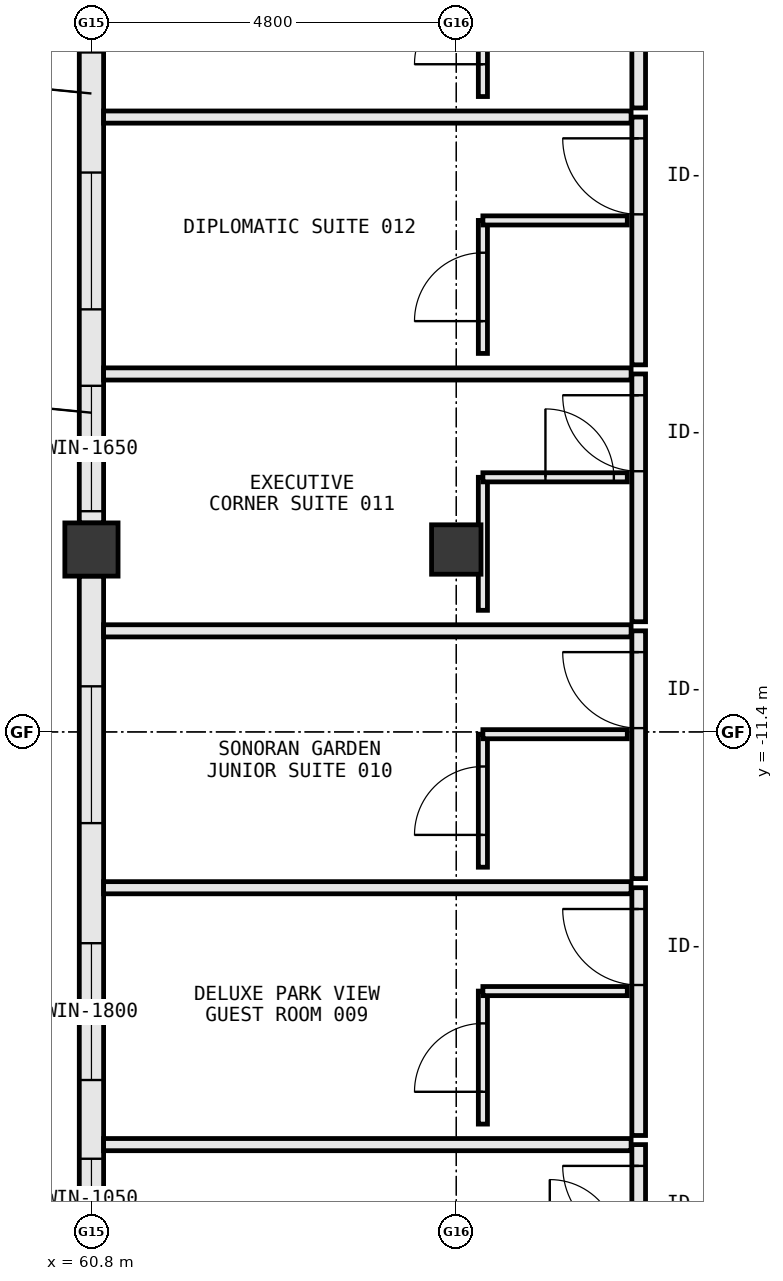
"""IFC4 building model, lengths in metres.
Left out: names, types, materials, properties, quantities, classifications, styles, units other than length and angle.
Written with IfcOpenShell. Run it as: python <this file> out.ifc"""

import sys

from ifc_helpers import new_model, si_unit, direction, frame, frame_2d, origin, origin_2d, place, context, subcontext, project, spatial, rectangle, extrude, element, fill, save


model = new_model("IFC4")
c1 = context("Model", 3, precision=1e-05, world=origin(), true_north=direction((0.0, 1.0)))
c2 = subcontext(c1, "Body", "Model", "MODEL_VIEW")
j1 = project(units=[si_unit("LENGTHUNIT", "METRE"), si_unit("PLANEANGLEUNIT", "RADIAN")], contexts=[c1])
p1 = place(None, origin())
s1 = spatial("IfcSite", under=j1, at=p1, CompositionType="ELEMENT")
p2 = place(p1, origin())
s2 = spatial("IfcBuilding", under=s1, at=p2, CompositionType="ELEMENT")
p3 = place(p2, frame((0.0, 0.0, 10.8)))
s3 = spatial("IfcBuildingStorey", under=s2, at=p3, CompositionType="ELEMENT", Elevation=10.8)
p4 = place(p3, frame((60.8, -9.0, 0.0), z_axis=(0.0, 0.0, 1.0), x_axis=(1.0, 0.0, 0.0)))
e1 = element("IfcColumn", 1, at=p4, inside=s3, PredefinedType="COLUMN", context=c2, shape_type="SweptSolid", body=[
    extrude(rectangle(XDim=0.7, YDim=0.7, at=origin_2d()), origin(), (0.0, 0.0, 1.0), 5.4),
])
p5 = place(p3, frame((65.6, -9.0, 0.0), z_axis=(0.0, 0.0, 1.0), x_axis=(1.0, 0.0, 0.0)))
e2 = element("IfcColumn", 2, at=p5, inside=s3, PredefinedType="COLUMN", context=c2, shape_type="SweptSolid", body=[
    extrude(rectangle(XDim=0.65, YDim=0.65, at=origin_2d()), origin(), (0.0, 0.0, 1.0), 5.4),
])
p6 = place(p3, frame((60.8, 0.252, 0.0), z_axis=(0.0, 0.0, 1.0), x_axis=(0.0, -1.0, 0.0)))
e3 = element("IfcWall", 3, at=p6, inside=s3, PredefinedType="STANDARD", context=c2, shape_type="SweptSolid", body=[
    extrude(rectangle(XDim=8.904, YDim=0.32, at=frame_2d((4.452, 0.0))), origin(), (0.0, 0.0, 1.0), 4.155),
])
p7 = place(p6, frame((7.098, 0.0, 0.85)))
e4 = element("IfcOpeningElement", 4, at=p7, cuts=e3, PredefinedType="OPENING", context=c2, shape_type="SweptSolid", body=[
    extrude(rectangle(XDim=1.65, YDim=1.8, at=frame_2d((0.825, 0.9))), frame((0.0, 0.172, 0.0), z_axis=(0.0, -1.0, 0.0), x_axis=(1.0, 0.0, 0.0)), (0.0, 0.0, 1.0), 0.344),
])
p8 = place(p6, frame((4.292, 0.0, 0.85)))
e5 = element("IfcOpeningElement", 5, at=p8, cuts=e3, PredefinedType="OPENING", context=c2, shape_type="SweptSolid", body=[
    extrude(rectangle(XDim=1.8, YDim=1.85, at=frame_2d((0.9, 0.925))), frame((0.0, 0.172, 0.0), z_axis=(0.0, -1.0, 0.0), x_axis=(1.0, 0.0, 0.0)), (0.0, 0.0, 1.0), 0.344),
])
p9 = place(p6, frame((0.912, 0.0, 0.85)))
e6 = element("IfcOpeningElement", 6, at=p9, cuts=e3, PredefinedType="OPENING", context=c2, shape_type="SweptSolid", body=[
    extrude(rectangle(XDim=1.8, YDim=1.85, at=frame_2d((0.9, 0.925))), frame((0.0, 0.172, 0.0), z_axis=(0.0, -1.0, 0.0), x_axis=(1.0, 0.0, 0.0)), (0.0, 0.0, 1.0), 0.344),
])
p10 = place(p3, frame((60.8, -9.348, 0.0), z_axis=(0.0, 0.0, 1.0), x_axis=(0.0, -1.0, 0.0)))
e7 = element("IfcWall", 7, at=p10, inside=s3, PredefinedType="STANDARD", context=c2, shape_type="SweptSolid", body=[
    extrude(rectangle(XDim=8.904, YDim=0.32, at=frame_2d((4.452, 0.0))), origin(), (0.0, 0.0, 1.0), 4.155),
])
p11 = place(p10, frame((7.668, 0.0, 0.85)))
e8 = element("IfcOpeningElement", 8, at=p11, cuts=e7, PredefinedType="OPENING", context=c2, shape_type="SweptSolid", body=[
    extrude(rectangle(XDim=1.05, YDim=1.45, at=frame_2d((0.525, 0.725))), frame((0.0, 0.172, 0.0), z_axis=(0.0, -1.0, 0.0), x_axis=(1.0, 0.0, 0.0)), (0.0, 0.0, 1.0), 0.344),
])
p12 = place(p10, frame((4.832, 0.0, 0.85)))
e9 = element("IfcOpeningElement", 9, at=p12, cuts=e7, PredefinedType="OPENING", context=c2, shape_type="SweptSolid", body=[
    extrude(rectangle(XDim=1.8, YDim=1.85, at=frame_2d((0.9, 0.925))), frame((0.0, 0.172, 0.0), z_axis=(0.0, -1.0, 0.0), x_axis=(1.0, 0.0, 0.0)), (0.0, 0.0, 1.0), 0.344),
])
p13 = place(p10, frame((1.452, 0.0, 0.85)))
e10 = element("IfcOpeningElement", 10, at=p13, cuts=e7, PredefinedType="OPENING", context=c2, shape_type="SweptSolid", body=[
    extrude(rectangle(XDim=1.8, YDim=1.85, at=frame_2d((0.9, 0.925))), frame((0.0, 0.172, 0.0), z_axis=(0.0, -1.0, 0.0), x_axis=(1.0, 0.0, 0.0)), (0.0, 0.0, 1.0), 0.344),
])
p14 = place(p3, frame((68.0, -20.09, 0.0), z_axis=(0.0, 0.0, 1.0), x_axis=(0.0, 1.0, 0.0)))
e11 = element("IfcWall", 11, at=p14, inside=s3, PredefinedType="PARTITIONING", context=c2, shape_type="SweptSolid", body=[
    extrude(rectangle(XDim=3.26, YDim=0.18, at=frame_2d((1.63, 0.0))), origin(), (0.0, 0.0, 1.0), 4.8),
])
p15 = place(p14, frame((1.98, 0.0, 0.0)))
e12 = element("IfcOpeningElement", 12, at=p15, cuts=e11, PredefinedType="OPENING", context=c2, shape_type="SweptSolid", body=[
    extrude(rectangle(XDim=1.0, YDim=2.2, at=frame_2d((0.5, 1.1))), frame((0.0, 0.102, 0.0), z_axis=(0.0, -1.0, 0.0), x_axis=(1.0, 0.0, 0.0)), (0.0, 0.0, 1.0), 0.204),
])
p16 = place(p3, frame((60.96, -16.83, 0.0), z_axis=(0.0, 0.0, 1.0), x_axis=(1.0, 0.0, 0.0)))
e13 = element("IfcWall", 13, at=p16, inside=s3, PredefinedType="PARTITIONING", context=c2, shape_type="SweptSolid", body=[
    extrude(rectangle(XDim=6.94, YDim=0.16, at=frame_2d((3.47, 0.0))), origin(), (0.0, 0.0, 1.0), 4.8),
])
p17 = place(p3, frame((68.0, -16.71, 0.0), z_axis=(0.0, 0.0, 1.0), x_axis=(0.0, 1.0, 0.0)))
e14 = element("IfcWall", 14, at=p17, inside=s3, PredefinedType="PARTITIONING", context=c2, shape_type="SweptSolid", body=[
    extrude(rectangle(XDim=3.26, YDim=0.18, at=frame_2d((1.63, 0.0))), origin(), (0.0, 0.0, 1.0), 4.8),
])
p18 = place(p17, frame((1.98, 0.0, 0.0)))
e15 = element("IfcOpeningElement", 15, at=p18, cuts=e14, PredefinedType="OPENING", context=c2, shape_type="SweptSolid", body=[
    extrude(rectangle(XDim=1.0, YDim=2.2, at=frame_2d((0.5, 1.1))), frame((0.0, 0.102, 0.0), z_axis=(0.0, -1.0, 0.0), x_axis=(1.0, 0.0, 0.0)), (0.0, 0.0, 1.0), 0.204),
])
p19 = place(p3, frame((60.96, -13.45, 0.0), z_axis=(0.0, 0.0, 1.0), x_axis=(1.0, 0.0, 0.0)))
e16 = element("IfcWall", 16, at=p19, inside=s3, PredefinedType="PARTITIONING", context=c2, shape_type="SweptSolid", body=[
    extrude(rectangle(XDim=6.94, YDim=0.16, at=frame_2d((3.47, 0.0))), origin(), (0.0, 0.0, 1.0), 4.8),
])
p20 = place(p3, frame((65.95, -16.56, 0.0), z_axis=(0.0, 0.0, 1.0), x_axis=(0.0, 1.0, 0.0)))
e17 = element("IfcWall", 17, at=p20, inside=s3, PredefinedType="PARTITIONING", context=c2, shape_type="SweptSolid", body=[
    extrude(rectangle(XDim=1.75, YDim=0.12, at=frame_2d((0.875, 0.0))), origin(), (0.0, 0.0, 1.0), 4.155),
])
p21 = place(p20, frame((0.425, 0.0, 0.0)))
e18 = element("IfcOpeningElement", 18, at=p21, cuts=e17, PredefinedType="OPENING", context=c2, shape_type="SweptSolid", body=[
    extrude(rectangle(XDim=0.9, YDim=2.15, at=frame_2d((0.45, 1.075))), frame((0.0, 0.072, 0.0), z_axis=(0.0, -1.0, 0.0), x_axis=(1.0, 0.0, 0.0)), (0.0, 0.0, 1.0), 0.144),
])
p22 = place(p3, frame((65.95, -14.81, 0.0), z_axis=(0.0, 0.0, 1.0), x_axis=(1.0, 0.0, 0.0)))
e19 = element("IfcWall", 19, at=p22, inside=s3, PredefinedType="PARTITIONING", context=c2, shape_type="SweptSolid", body=[
    extrude(rectangle(XDim=1.9, YDim=0.12, at=frame_2d((0.95, 0.0))), origin(), (0.0, 0.0, 1.0), 4.8),
])
p23 = place(p3, frame((68.0, -13.33, 0.0), z_axis=(0.0, 0.0, 1.0), x_axis=(0.0, 1.0, 0.0)))
e20 = element("IfcWall", 20, at=p23, inside=s3, PredefinedType="PARTITIONING", context=c2, shape_type="SweptSolid", body=[
    extrude(rectangle(XDim=3.26, YDim=0.18, at=frame_2d((1.63, 0.0))), origin(), (0.0, 0.0, 1.0), 4.8),
])
p24 = place(p23, frame((1.98, 0.0, 0.0)))
e21 = element("IfcOpeningElement", 21, at=p24, cuts=e20, PredefinedType="OPENING", context=c2, shape_type="SweptSolid", body=[
    extrude(rectangle(XDim=1.0, YDim=2.2, at=frame_2d((0.5, 1.1))), frame((0.0, 0.102, 0.0), z_axis=(0.0, -1.0, 0.0), x_axis=(1.0, 0.0, 0.0)), (0.0, 0.0, 1.0), 0.204),
])
p25 = place(p3, frame((60.96, -10.07, 0.0), z_axis=(0.0, 0.0, 1.0), x_axis=(1.0, 0.0, 0.0)))
e22 = element("IfcWall", 22, at=p25, inside=s3, PredefinedType="PARTITIONING", context=c2, shape_type="SweptSolid", body=[
    extrude(rectangle(XDim=6.94, YDim=0.16, at=frame_2d((3.47, 0.0))), origin(), (0.0, 0.0, 1.0), 4.8),
])
p26 = place(p3, frame((65.95, -13.18, 0.0), z_axis=(0.0, 0.0, 1.0), x_axis=(0.0, 1.0, 0.0)))
e23 = element("IfcWall", 23, at=p26, inside=s3, PredefinedType="PARTITIONING", context=c2, shape_type="SweptSolid", body=[
    extrude(rectangle(XDim=1.75, YDim=0.12, at=frame_2d((0.875, 0.0))), origin(), (0.0, 0.0, 1.0), 4.155),
])
p27 = place(p26, frame((0.425, 0.0, 0.0)))
e24 = element("IfcOpeningElement", 24, at=p27, cuts=e23, PredefinedType="OPENING", context=c2, shape_type="SweptSolid", body=[
    extrude(rectangle(XDim=0.9, YDim=2.15, at=frame_2d((0.45, 1.075))), frame((0.0, 0.072, 0.0), z_axis=(0.0, -1.0, 0.0), x_axis=(1.0, 0.0, 0.0)), (0.0, 0.0, 1.0), 0.144),
])
p28 = place(p3, frame((65.95, -11.43, 0.0), z_axis=(0.0, 0.0, 1.0), x_axis=(1.0, 0.0, 0.0)))
e25 = element("IfcWall", 25, at=p28, inside=s3, PredefinedType="PARTITIONING", context=c2, shape_type="SweptSolid", body=[
    extrude(rectangle(XDim=1.9, YDim=0.12, at=frame_2d((0.95, 0.0))), origin(), (0.0, 0.0, 1.0), 4.8),
])
p29 = place(p3, frame((68.0, -9.95, 0.0), z_axis=(0.0, 0.0, 1.0), x_axis=(0.0, 1.0, 0.0)))
e26 = element("IfcWall", 26, at=p29, inside=s3, PredefinedType="PARTITIONING", context=c2, shape_type="SweptSolid", body=[
    extrude(rectangle(XDim=3.26, YDim=0.18, at=frame_2d((1.63, 0.0))), origin(), (0.0, 0.0, 1.0), 4.8),
])
p30 = place(p29, frame((1.98, 0.0, 0.0)))
e27 = element("IfcOpeningElement", 27, at=p30, cuts=e26, PredefinedType="OPENING", context=c2, shape_type="SweptSolid", body=[
    extrude(rectangle(XDim=1.0, YDim=2.2, at=frame_2d((0.5, 1.1))), frame((0.0, 0.102, 0.0), z_axis=(0.0, -1.0, 0.0), x_axis=(1.0, 0.0, 0.0)), (0.0, 0.0, 1.0), 0.204),
])
p31 = place(p3, frame((60.96, -6.69, 0.0), z_axis=(0.0, 0.0, 1.0), x_axis=(1.0, 0.0, 0.0)))
e28 = element("IfcWall", 28, at=p31, inside=s3, PredefinedType="PARTITIONING", context=c2, shape_type="SweptSolid", body=[
    extrude(rectangle(XDim=6.94, YDim=0.16, at=frame_2d((3.47, 0.0))), origin(), (0.0, 0.0, 1.0), 4.8),
])
p32 = place(p3, frame((65.95, -9.8, 0.0), z_axis=(0.0, 0.0, 1.0), x_axis=(0.0, 1.0, 0.0)))
e29 = element("IfcWall", 29, at=p32, inside=s3, PredefinedType="PARTITIONING", context=c2, shape_type="SweptSolid", body=[
    extrude(rectangle(XDim=1.75, YDim=0.12, at=frame_2d((0.875, 0.0))), origin(), (0.0, 0.0, 1.0), 4.155),
])
p33 = place(p3, frame((65.95, -8.05, 0.0), z_axis=(0.0, 0.0, 1.0), x_axis=(1.0, 0.0, 0.0)))
e30 = element("IfcWall", 30, at=p33, inside=s3, PredefinedType="PARTITIONING", context=c2, shape_type="SweptSolid", body=[
    extrude(rectangle(XDim=1.9, YDim=0.12, at=frame_2d((0.95, 0.0))), origin(), (0.0, 0.0, 1.0), 4.8),
])
p34 = place(p33, frame((0.823, 0.0, 0.0)))
e31 = element("IfcOpeningElement", 31, at=p34, cuts=e30, PredefinedType="OPENING", context=c2, shape_type="SweptSolid", body=[
    extrude(rectangle(XDim=0.9, YDim=2.15, at=frame_2d((0.45, 1.075))), frame((0.0, 0.072, 0.0), z_axis=(0.0, -1.0, 0.0), x_axis=(1.0, 0.0, 0.0)), (0.0, 0.0, 1.0), 0.144),
])
p35 = place(p3, frame((68.0, -6.57, 0.0), z_axis=(0.0, 0.0, 1.0), x_axis=(0.0, 1.0, 0.0)))
e32 = element("IfcWall", 32, at=p35, inside=s3, PredefinedType="PARTITIONING", context=c2, shape_type="SweptSolid", body=[
    extrude(rectangle(XDim=3.26, YDim=0.18, at=frame_2d((1.63, 0.0))), origin(), (0.0, 0.0, 1.0), 4.8),
])
p36 = place(p35, frame((1.98, 0.0, 0.0)))
e33 = element("IfcOpeningElement", 33, at=p36, cuts=e32, PredefinedType="OPENING", context=c2, shape_type="SweptSolid", body=[
    extrude(rectangle(XDim=1.0, YDim=2.2, at=frame_2d((0.5, 1.1))), frame((0.0, 0.102, 0.0), z_axis=(0.0, -1.0, 0.0), x_axis=(1.0, 0.0, 0.0)), (0.0, 0.0, 1.0), 0.204),
])
p37 = place(p3, frame((60.96, -3.31, 0.0), z_axis=(0.0, 0.0, 1.0), x_axis=(1.0, 0.0, 0.0)))
e34 = element("IfcWall", 34, at=p37, inside=s3, PredefinedType="PARTITIONING", context=c2, shape_type="SweptSolid", body=[
    extrude(rectangle(XDim=6.94, YDim=0.16, at=frame_2d((3.47, 0.0))), origin(), (0.0, 0.0, 1.0), 4.8),
])
p38 = place(p3, frame((65.95, -6.42, 0.0), z_axis=(0.0, 0.0, 1.0), x_axis=(0.0, 1.0, 0.0)))
e35 = element("IfcWall", 35, at=p38, inside=s3, PredefinedType="PARTITIONING", context=c2, shape_type="SweptSolid", body=[
    extrude(rectangle(XDim=1.75, YDim=0.12, at=frame_2d((0.875, 0.0))), origin(), (0.0, 0.0, 1.0), 4.155),
])
p39 = place(p38, frame((0.425, 0.0, 0.0)))
e36 = element("IfcOpeningElement", 36, at=p39, cuts=e35, PredefinedType="OPENING", context=c2, shape_type="SweptSolid", body=[
    extrude(rectangle(XDim=0.9, YDim=2.15, at=frame_2d((0.45, 1.075))), frame((0.0, 0.072, 0.0), z_axis=(0.0, -1.0, 0.0), x_axis=(1.0, 0.0, 0.0)), (0.0, 0.0, 1.0), 0.144),
])
p40 = place(p3, frame((65.95, -4.67, 0.0), z_axis=(0.0, 0.0, 1.0), x_axis=(1.0, 0.0, 0.0)))
e37 = element("IfcWall", 37, at=p40, inside=s3, PredefinedType="PARTITIONING", context=c2, shape_type="SweptSolid", body=[
    extrude(rectangle(XDim=1.9, YDim=0.12, at=frame_2d((0.95, 0.0))), origin(), (0.0, 0.0, 1.0), 4.8),
])
p41 = place(p3, frame((68.0, -3.19, 0.0), z_axis=(0.0, 0.0, 1.0), x_axis=(0.0, 1.0, 0.0)))
e38 = element("IfcWall", 38, at=p41, inside=s3, PredefinedType="PARTITIONING", context=c2, shape_type="SweptSolid", body=[
    extrude(rectangle(XDim=3.26, YDim=0.18, at=frame_2d((1.63, 0.0))), origin(), (0.0, 0.0, 1.0), 4.8),
])
p42 = place(p41, frame((1.98, 0.0, 0.0)))
e39 = element("IfcOpeningElement", 39, at=p42, cuts=e38, PredefinedType="OPENING", context=c2, shape_type="SweptSolid", body=[
    extrude(rectangle(XDim=1.0, YDim=2.2, at=frame_2d((0.5, 1.1))), frame((0.0, 0.102, 0.0), z_axis=(0.0, -1.0, 0.0), x_axis=(1.0, 0.0, 0.0)), (0.0, 0.0, 1.0), 0.204),
])
p43 = place(p3, frame((65.95, -3.04, 0.0), z_axis=(0.0, 0.0, 1.0), x_axis=(0.0, 1.0, 0.0)))
e40 = element("IfcWall", 40, at=p43, inside=s3, PredefinedType="PARTITIONING", context=c2, shape_type="SweptSolid", body=[
    extrude(rectangle(XDim=1.75, YDim=0.12, at=frame_2d((0.875, 0.0))), origin(), (0.0, 0.0, 1.0), 4.155),
])
p44 = place(p43, frame((0.425, 0.0, 0.0)))
e41 = element("IfcOpeningElement", 41, at=p44, cuts=e40, PredefinedType="OPENING", context=c2, shape_type="SweptSolid", body=[
    extrude(rectangle(XDim=0.9, YDim=2.15, at=frame_2d((0.45, 1.075))), frame((0.0, 0.072, 0.0), z_axis=(0.0, -1.0, 0.0), x_axis=(1.0, 0.0, 0.0)), (0.0, 0.0, 1.0), 0.144),
])
p45 = place(p11, origin())
e42 = element("IfcWindow", 42, at=p45, inside=s3, PartitioningType="SINGLE_PANEL", PredefinedType="WINDOW", context=c2, shape_type="SweptSolid", body=[
    extrude(rectangle(XDim=1.05, YDim=1.45, at=frame_2d((0.525, 0.725))), frame((0.0, 0.03, 0.0), z_axis=(0.0, -1.0, 0.0), x_axis=(1.0, 0.0, 0.0)), (0.0, 0.0, 1.0), 0.06),
])
fill(e8, e42)
p46 = place(p12, origin())
e43 = element("IfcWindow", 43, at=p46, inside=s3, PartitioningType="SINGLE_PANEL", PredefinedType="WINDOW", context=c2, shape_type="SweptSolid", body=[
    extrude(rectangle(XDim=1.8, YDim=1.85, at=frame_2d((0.9, 0.925))), frame((0.0, 0.03, 0.0), z_axis=(0.0, -1.0, 0.0), x_axis=(1.0, 0.0, 0.0)), (0.0, 0.0, 1.0), 0.06),
])
fill(e9, e43)
p47 = place(p13, origin())
e44 = element("IfcWindow", 44, at=p47, inside=s3, PartitioningType="SINGLE_PANEL", PredefinedType="WINDOW", context=c2, shape_type="SweptSolid", body=[
    extrude(rectangle(XDim=1.8, YDim=1.85, at=frame_2d((0.9, 0.925))), frame((0.0, 0.03, 0.0), z_axis=(0.0, -1.0, 0.0), x_axis=(1.0, 0.0, 0.0)), (0.0, 0.0, 1.0), 0.06),
])
fill(e10, e44)
p48 = place(p7, origin())
e45 = element("IfcWindow", 45, at=p48, inside=s3, PartitioningType="SINGLE_PANEL", PredefinedType="WINDOW", context=c2, shape_type="SweptSolid", body=[
    extrude(rectangle(XDim=1.65, YDim=1.8, at=frame_2d((0.825, 0.9))), frame((0.0, 0.03, 0.0), z_axis=(0.0, -1.0, 0.0), x_axis=(1.0, 0.0, 0.0)), (0.0, 0.0, 1.0), 0.06),
])
fill(e4, e45)
p49 = place(p8, origin())
e46 = element("IfcWindow", 46, at=p49, inside=s3, PartitioningType="SINGLE_PANEL", PredefinedType="WINDOW", context=c2, shape_type="SweptSolid", body=[
    extrude(rectangle(XDim=1.8, YDim=1.85, at=frame_2d((0.9, 0.925))), frame((0.0, 0.03, 0.0), z_axis=(0.0, -1.0, 0.0), x_axis=(1.0, 0.0, 0.0)), (0.0, 0.0, 1.0), 0.06),
])
fill(e5, e46)
p50 = place(p9, origin())
e47 = element("IfcWindow", 47, at=p50, inside=s3, PartitioningType="SINGLE_PANEL", PredefinedType="WINDOW", context=c2, shape_type="SweptSolid", body=[
    extrude(rectangle(XDim=1.8, YDim=1.85, at=frame_2d((0.9, 0.925))), frame((0.0, 0.03, 0.0), z_axis=(0.0, -1.0, 0.0), x_axis=(1.0, 0.0, 0.0)), (0.0, 0.0, 1.0), 0.06),
])
fill(e6, e47)
p51 = place(p15, origin())
e48 = element("IfcDoor", 48, at=p51, inside=s3, OperationType="SINGLE_SWING_RIGHT", PredefinedType="DOOR", context=c2, shape_type="SweptSolid", body=[
    extrude(rectangle(XDim=1.0, YDim=2.2, at=frame_2d((0.5, 1.1))), frame((0.0, 0.025, 0.0), z_axis=(0.0, -1.0, 0.0), x_axis=(1.0, 0.0, 0.0)), (0.0, 0.0, 1.0), 0.05),
])
fill(e12, e48)
p52 = place(p18, origin())
e49 = element("IfcDoor", 49, at=p52, inside=s3, OperationType="SINGLE_SWING_RIGHT", PredefinedType="DOOR", context=c2, shape_type="SweptSolid", body=[
    extrude(rectangle(XDim=1.0, YDim=2.2, at=frame_2d((0.5, 1.1))), frame((0.0, 0.025, 0.0), z_axis=(0.0, -1.0, 0.0), x_axis=(1.0, 0.0, 0.0)), (0.0, 0.0, 1.0), 0.05),
])
fill(e15, e49)
p53 = place(p21, origin())
e50 = element("IfcDoor", 50, at=p53, inside=s3, OperationType="SINGLE_SWING_LEFT", PredefinedType="DOOR", context=c2, shape_type="SweptSolid", body=[
    extrude(rectangle(XDim=0.9, YDim=2.15, at=frame_2d((0.45, 1.075))), frame((0.0, 0.025, 0.0), z_axis=(0.0, -1.0, 0.0), x_axis=(1.0, 0.0, 0.0)), (0.0, 0.0, 1.0), 0.05),
])
fill(e18, e50)
p54 = place(p24, origin())
e51 = element("IfcDoor", 51, at=p54, inside=s3, OperationType="SINGLE_SWING_RIGHT", PredefinedType="DOOR", context=c2, shape_type="SweptSolid", body=[
    extrude(rectangle(XDim=1.0, YDim=2.2, at=frame_2d((0.5, 1.1))), frame((0.0, 0.025, 0.0), z_axis=(0.0, -1.0, 0.0), x_axis=(1.0, 0.0, 0.0)), (0.0, 0.0, 1.0), 0.05),
])
fill(e21, e51)
p55 = place(p27, origin())
e52 = element("IfcDoor", 52, at=p55, inside=s3, OperationType="SINGLE_SWING_LEFT", PredefinedType="DOOR", context=c2, shape_type="SweptSolid", body=[
    extrude(rectangle(XDim=0.9, YDim=2.15, at=frame_2d((0.45, 1.075))), frame((0.0, 0.025, 0.0), z_axis=(0.0, -1.0, 0.0), x_axis=(1.0, 0.0, 0.0)), (0.0, 0.0, 1.0), 0.05),
])
fill(e24, e52)
p56 = place(p30, origin())
e53 = element("IfcDoor", 53, at=p56, inside=s3, OperationType="SINGLE_SWING_RIGHT", PredefinedType="DOOR", context=c2, shape_type="SweptSolid", body=[
    extrude(rectangle(XDim=1.0, YDim=2.2, at=frame_2d((0.5, 1.1))), frame((0.0, 0.025, 0.0), z_axis=(0.0, -1.0, 0.0), x_axis=(1.0, 0.0, 0.0)), (0.0, 0.0, 1.0), 0.05),
])
fill(e27, e53)
p57 = place(p34, origin())
e54 = element("IfcDoor", 54, at=p57, inside=s3, OperationType="SINGLE_SWING_LEFT", PredefinedType="DOOR", context=c2, shape_type="SweptSolid", body=[
    extrude(rectangle(XDim=0.9, YDim=2.15, at=frame_2d((0.45, 1.075))), frame((0.0, 0.025, 0.0), z_axis=(0.0, -1.0, 0.0), x_axis=(1.0, 0.0, 0.0)), (0.0, 0.0, 1.0), 0.05),
])
fill(e31, e54)
p58 = place(p36, origin())
e55 = element("IfcDoor", 55, at=p58, inside=s3, OperationType="SINGLE_SWING_RIGHT", PredefinedType="DOOR", context=c2, shape_type="SweptSolid", body=[
    extrude(rectangle(XDim=1.0, YDim=2.2, at=frame_2d((0.5, 1.1))), frame((0.0, 0.025, 0.0), z_axis=(0.0, -1.0, 0.0), x_axis=(1.0, 0.0, 0.0)), (0.0, 0.0, 1.0), 0.05),
])
fill(e33, e55)
p59 = place(p39, origin())
e56 = element("IfcDoor", 56, at=p59, inside=s3, OperationType="SINGLE_SWING_LEFT", PredefinedType="DOOR", context=c2, shape_type="SweptSolid", body=[
    extrude(rectangle(XDim=0.9, YDim=2.15, at=frame_2d((0.45, 1.075))), frame((0.0, 0.025, 0.0), z_axis=(0.0, -1.0, 0.0), x_axis=(1.0, 0.0, 0.0)), (0.0, 0.0, 1.0), 0.05),
])
fill(e36, e56)
p60 = place(p44, origin())
e57 = element("IfcDoor", 57, at=p60, inside=s3, OperationType="SINGLE_SWING_LEFT", PredefinedType="DOOR", context=c2, shape_type="SweptSolid", body=[
    extrude(rectangle(XDim=0.9, YDim=2.15, at=frame_2d((0.45, 1.075))), frame((0.0, 0.025, 0.0), z_axis=(0.0, -1.0, 0.0), x_axis=(1.0, 0.0, 0.0)), (0.0, 0.0, 1.0), 0.05),
])
fill(e41, e57)
save(model, sys.argv[1])
